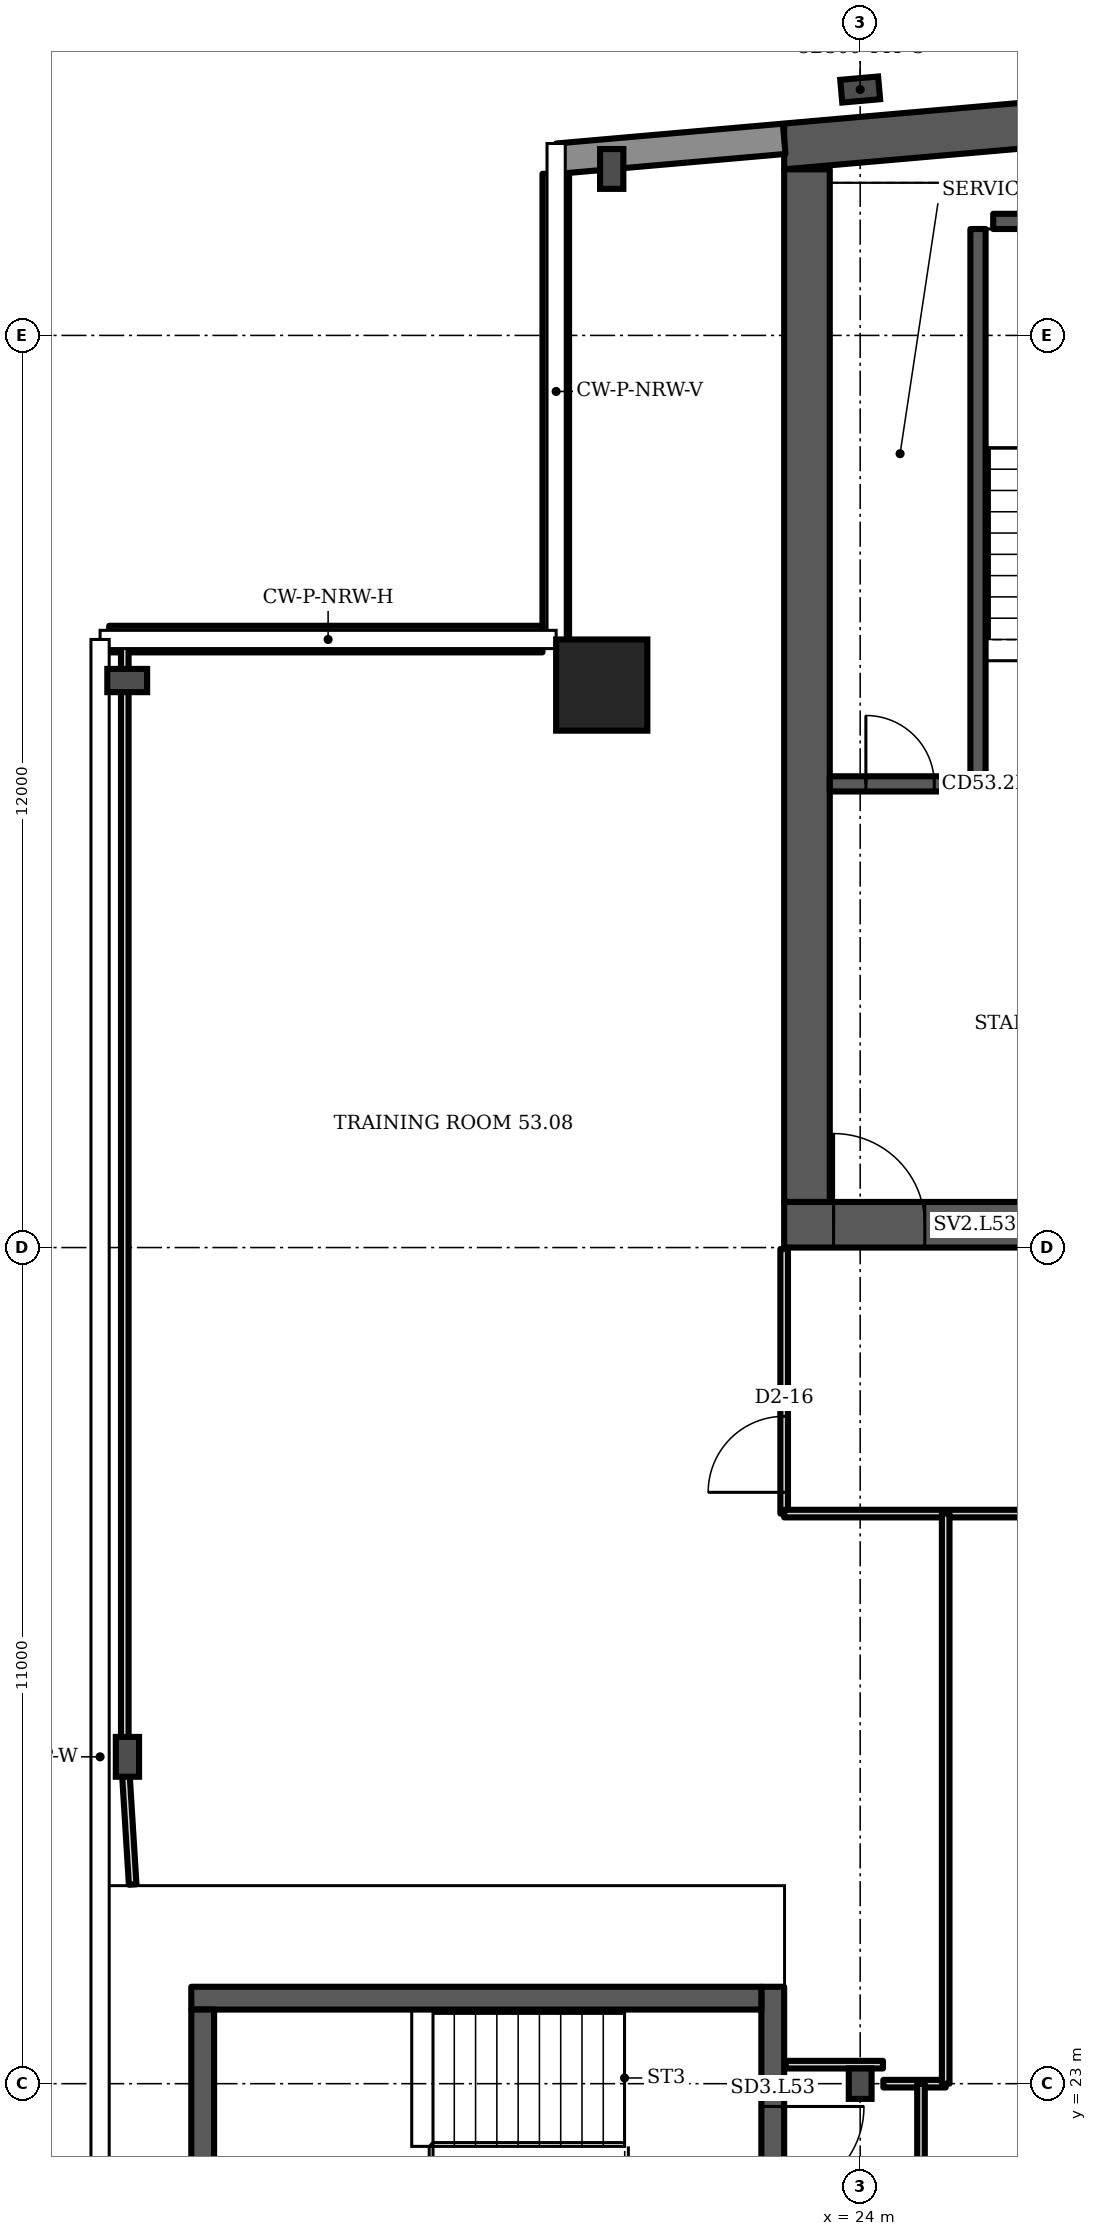
"""IFC4 building model, lengths in metres.
Left out: names, types, materials, properties, quantities, classifications, styles, units other than length and angle.
Written with IfcOpenShell. Run it as: python <this file> out.ifc"""

import sys

from ifc_helpers import new_model, si_unit, direction, frame, frame_2d, origin, origin_2d, place, context, subcontext, project, spatial, polyline, rectangle, i_section, outline, extrude, element, fill, save


model = new_model("IFC4")
c1 = context("Model", 3, precision=1e-05, world=origin(), true_north=direction((0.0, 1.0)))
c2 = subcontext(c1, "Body", "Model", "MODEL_VIEW")
j1 = project(units=[si_unit("LENGTHUNIT", "METRE"), si_unit("PLANEANGLEUNIT", "RADIAN")], contexts=[c1])
p1 = place(None, origin())
s1 = spatial("IfcSite", under=j1, at=p1, CompositionType="ELEMENT")
p2 = place(p1, origin())
s2 = spatial("IfcBuilding", under=s1, at=p2, CompositionType="ELEMENT")
p3 = place(p2, frame((0.0, 0.0, 214.3)))
s3 = spatial("IfcBuildingStorey", under=s2, at=p3, CompositionType="ELEMENT", Elevation=214.3)
p4 = place(p3, frame((0.0, 0.0, -0.0)))
e1 = element("IfcWall", 1, at=p4, inside=s3, PredefinedType="SHEAR", context=c2, shape_type="SweptSolid", body=[
    extrude(outline(polyline([(23.0, 48.185), (40.5, 49.716), (58.0, 48.185), (58.0, 48.787), (40.5, 50.318), (23.0, 48.787), (23.0, 48.185)])), origin(), (0.0, 0.0, 1.0), 3.6),
])
p5 = place(p3, frame((23.0, 34.3, 0.0), z_axis=(0.0, 0.0, 1.0), x_axis=(1.0, 0.0, 0.0)))
e2 = element("IfcWall", 2, at=p5, inside=s3, PredefinedType="SHEAR", context=c2, shape_type="SweptSolid", body=[
    extrude(rectangle(XDim=35.0, YDim=0.6, at=frame_2d((17.5, 0.0))), origin(), (0.0, 0.0, 1.0), 3.6),
])
p6 = place(p5, frame((0.65, 0.0, 0.0)))
e3 = element("IfcOpeningElement", 3, at=p6, cuts=e2, PredefinedType="OPENING", context=c2, shape_type="SweptSolid", body=[
    extrude(rectangle(XDim=1.2, YDim=2.1, at=frame_2d((0.6, 1.05))), frame((0.0, 0.31, 0.0), z_axis=(0.0, -1.0, 0.0), x_axis=(1.0, 0.0, 0.0)), (0.0, 0.0, 1.0), 0.62),
])
p7 = place(p5, frame((7.717, 0.0, 0.0)))
e4 = element("IfcOpeningElement", 4, at=p7, cuts=e2, PredefinedType="OPENING", context=c2, shape_type="SweptSolid", body=[
    extrude(rectangle(XDim=1.1, YDim=2.1, at=frame_2d((0.55, 1.05))), frame((0.0, 0.31, 0.0), z_axis=(0.0, -1.0, 0.0), x_axis=(1.0, 0.0, 0.0)), (0.0, 0.0, 1.0), 0.62),
])
p8 = place(p5, frame((12.183, 0.0, 0.0)))
e5 = element("IfcOpeningElement", 5, at=p8, cuts=e2, PredefinedType="OPENING", context=c2, shape_type="SweptSolid", body=[
    extrude(rectangle(XDim=1.1, YDim=2.1, at=frame_2d((0.55, 1.05))), frame((0.0, 0.31, 0.0), z_axis=(0.0, -1.0, 0.0), x_axis=(1.0, 0.0, 0.0)), (0.0, 0.0, 1.0), 0.62),
])
p9 = place(p5, frame((9.8, 0.0, 0.0)))
e6 = element("IfcOpeningElement", 6, at=p9, cuts=e2, PredefinedType="OPENING", context=c2, shape_type="SweptSolid", body=[
    extrude(rectangle(XDim=1.4, YDim=2.1, at=frame_2d((0.7, 1.05))), frame((0.0, 0.31, 0.0), z_axis=(0.0, -1.0, 0.0), x_axis=(1.0, 0.0, 0.0)), (0.0, 0.0, 1.0), 0.62),
])
p10 = place(p5, frame((14.717, 0.0, 0.0)))
e7 = element("IfcOpeningElement", 7, at=p10, cuts=e2, PredefinedType="OPENING", context=c2, shape_type="SweptSolid", body=[
    extrude(rectangle(XDim=1.1, YDim=2.1, at=frame_2d((0.55, 1.05))), frame((0.0, 0.31, 0.0), z_axis=(0.0, -1.0, 0.0), x_axis=(1.0, 0.0, 0.0)), (0.0, 0.0, 1.0), 0.62),
])
p11 = place(p5, frame((16.95, 0.0, 0.0)))
e8 = element("IfcOpeningElement", 8, at=p11, cuts=e2, PredefinedType="OPENING", context=c2, shape_type="SweptSolid", body=[
    extrude(rectangle(XDim=1.1, YDim=2.1, at=frame_2d((0.55, 1.05))), frame((0.0, 0.31, 0.0), z_axis=(0.0, -1.0, 0.0), x_axis=(1.0, 0.0, 0.0)), (0.0, 0.0, 1.0), 0.62),
])
p12 = place(p5, frame((19.183, 0.0, 0.0)))
e9 = element("IfcOpeningElement", 9, at=p12, cuts=e2, PredefinedType="OPENING", context=c2, shape_type="SweptSolid", body=[
    extrude(rectangle(XDim=1.1, YDim=2.1, at=frame_2d((0.55, 1.05))), frame((0.0, 0.31, 0.0), z_axis=(0.0, -1.0, 0.0), x_axis=(1.0, 0.0, 0.0)), (0.0, 0.0, 1.0), 0.62),
])
p13 = place(p5, frame((26.15, 0.0, 0.0)))
e10 = element("IfcOpeningElement", 10, at=p13, cuts=e2, PredefinedType="OPENING", context=c2, shape_type="SweptSolid", body=[
    extrude(rectangle(XDim=1.2, YDim=2.1, at=frame_2d((0.6, 1.05))), frame((0.0, 0.31, 0.0), z_axis=(0.0, -1.0, 0.0), x_axis=(1.0, 0.0, 0.0)), (0.0, 0.0, 1.0), 0.62),
])
p14 = place(p5, frame((30.8, 0.0, 0.0)))
e11 = element("IfcOpeningElement", 11, at=p14, cuts=e2, PredefinedType="OPENING", context=c2, shape_type="SweptSolid", body=[
    extrude(rectangle(XDim=1.4, YDim=2.1, at=frame_2d((0.7, 1.05))), frame((0.0, 0.31, 0.0), z_axis=(0.0, -1.0, 0.0), x_axis=(1.0, 0.0, 0.0)), (0.0, 0.0, 1.0), 0.62),
])
p15 = place(p3, frame((23.3, 34.6, 0.0), z_axis=(0.0, 0.0, 1.0), x_axis=(0.0, 1.0, 0.0)))
e12 = element("IfcWall", 12, at=p15, inside=s3, PredefinedType="SHEAR", context=c2, shape_type="SweptSolid", body=[
    extrude(rectangle(XDim=13.585, YDim=0.6, at=frame_2d((6.792, 0.0))), origin(), (0.0, 0.0, 1.0), 3.6),
])
p16 = place(p3, frame((20.6, 41.4, 0.0), z_axis=(0.0, 0.0, 1.0), x_axis=(1.0, 0.0, 0.0)))
e13 = element("IfcColumn", 13, at=p16, inside=s3, PredefinedType="COLUMN", context=c2, shape_type="SweptSolid", body=[
    extrude(rectangle(XDim=1.2, YDim=1.2, at=origin_2d()), origin(), (0.0, 0.0, 1.0), 3.6),
])
for number, where, z_axis, x_axis in (
    (14, (20.731, 48.19, 0.0), (0.0, 0.0, 1.0), (-1.0, 0.0, 0.0)),
    (15, (14.357, 41.46, 0.0), (0.0, 0.0, 1.0), (0.0, 1.0, 0.0)),
    (16, (14.36, 27.3, 0.0), (0.0, 0.0, 1.0), (-1.0, 0.0, 0.0)),
):
    element("IfcColumn", number, at=place(p3, frame(where, z_axis=z_axis, x_axis=x_axis)), inside=s3, PredefinedType="COLUMN", context=c2, shape_type="SweptSolid", body=[
        extrude(i_section(OverallWidth=0.306, OverallDepth=0.524, WebThickness=0.021, FlangeThickness=0.04, FilletRadius=0.027, at=origin_2d()), origin(), (0.0, 0.0, 1.0), 3.6),
    ])
p17 = place(p3, frame((24.0, 23.0, 0.0), z_axis=(0.0, 0.0, 1.0), x_axis=(1.0, 0.0, 0.0)))
e17 = element("IfcColumn", 17, at=p17, inside=s3, PredefinedType="COLUMN", context=c2, shape_type="SweptSolid", body=[
    extrude(i_section(OverallWidth=0.3, OverallDepth=0.4, WebThickness=0.013, FlangeThickness=0.024, FilletRadius=0.027, at=origin_2d()), origin(), (0.0, 0.0, 1.0), 3.6),
])
p18 = place(p3, frame((24.0, 49.235, 0.0), z_axis=(0.0, 0.0, 1.0), x_axis=(-0.087156, 0.996197, 0.0)))
e18 = element("IfcColumn", 18, at=p18, inside=s3, PredefinedType="COLUMN", context=c2, shape_type="SweptSolid", body=[
    extrude(i_section(OverallWidth=0.3, OverallDepth=0.5, WebThickness=0.014, FlangeThickness=0.028, FilletRadius=0.027, at=origin_2d()), origin(), (0.0, 0.0, 1.0), 3.6),
])
p19 = place(p3, frame((23.0, 48.587, 0.0), z_axis=(0.0, 0.0, 1.0), x_axis=(-0.996194, -0.087168, 0.0)))
e19 = element("IfcWall", 19, at=p19, inside=s3, PredefinedType="SOLIDWALL", context=c2, shape_type="SweptSolid", body=[
    extrude(rectangle(XDim=2.994, YDim=0.4, at=frame_2d((1.497, 0.0))), origin(), (0.0, 0.0, 1.0), 3.2),
])
p20 = place(p3, frame((19.995, 48.126, 0.0), z_axis=(0.0, 0.0, 1.0), x_axis=(0.0, -1.0, 0.0)))
e20 = element("IfcWall", 20, at=p20, inside=s3, PredefinedType="SOLIDWALL", context=c2, shape_type="SweptSolid", body=[
    extrude(rectangle(XDim=6.126, YDim=0.35, at=frame_2d((3.063, 0.0))), origin(), (0.0, 0.0, 1.0), 1.0),
])
p21 = place(p3, frame((19.82, 42.005, 0.0), z_axis=(0.0, 0.0, 1.0), x_axis=(-1.0, 0.0, 0.0)))
e21 = element("IfcWall", 21, at=p21, inside=s3, PredefinedType="SOLIDWALL", context=c2, shape_type="SweptSolid", body=[
    extrude(rectangle(XDim=5.7, YDim=0.35, at=frame_2d((2.85, 0.0))), origin(), (0.0, 0.0, 1.0), 1.0),
])
p22 = place(p3, frame((23.6, 40.1, 0.0), z_axis=(0.0, 0.0, 1.0), x_axis=(1.0, 0.0, 0.0)))
e22 = element("IfcWall", 22, at=p22, inside=s3, PredefinedType="SHEAR", context=c2, shape_type="SweptSolid", body=[
    extrude(rectangle(XDim=6.1, YDim=0.2, at=frame_2d((3.05, 0.0))), origin(), (0.0, 0.0, 1.0), 3.2),
])
p23 = place(p22, frame((3.325, 0.0, 0.0)))
e23 = element("IfcOpeningElement", 23, at=p23, cuts=e22, PredefinedType="OPENING", context=c2, shape_type="SweptSolid", body=[
    extrude(rectangle(XDim=1.2, YDim=2.1, at=frame_2d((0.6, 1.05))), frame((0.0, 0.11, 0.0), z_axis=(0.0, -1.0, 0.0), x_axis=(1.0, 0.0, 0.0)), (0.0, 0.0, 1.0), 0.22),
])
p24 = place(p22, frame((0.475, 0.0, 0.0)))
e24 = element("IfcOpeningElement", 24, at=p24, cuts=e22, PredefinedType="OPENING", context=c2, shape_type="SweptSolid", body=[
    extrude(rectangle(XDim=0.9, YDim=2.1, at=frame_2d((0.45, 1.05))), frame((0.0, 0.11, 0.0), z_axis=(0.0, -1.0, 0.0), x_axis=(1.0, 0.0, 0.0)), (0.0, 0.0, 1.0), 0.22),
])
p25 = place(p3, frame((25.55, 40.2, 0.0), z_axis=(0.0, 0.0, 1.0), x_axis=(0.0, 1.0, 0.0)))
e25 = element("IfcWall", 25, at=p25, inside=s3, PredefinedType="SHEAR", context=c2, shape_type="SweptSolid", body=[
    extrude(rectangle(XDim=7.2, YDim=0.2, at=frame_2d((3.6, 0.0))), origin(), (0.0, 0.0, 1.0), 3.2),
])
p26 = place(p3, frame((25.75, 47.5, 0.0), z_axis=(0.0, 0.0, 1.0), x_axis=(1.0, 0.0, 0.0)))
e26 = element("IfcWall", 26, at=p26, inside=s3, PredefinedType="SHEAR", context=c2, shape_type="SweptSolid", body=[
    extrude(rectangle(XDim=3.95, YDim=0.2, at=frame_2d((1.975, 0.0))), origin(), (0.0, 0.0, 1.0), 3.2),
])
p27 = place(p3, frame((22.85, 19.925, 0.0), z_axis=(0.0, 0.0, 1.0), x_axis=(0.0, 1.0, 0.0)))
e27 = element("IfcWall", 27, at=p27, inside=s3, PredefinedType="SHEAR", context=c2, shape_type="SweptSolid", body=[
    extrude(rectangle(XDim=4.35, YDim=0.3, at=frame_2d((2.175, 0.0))), origin(), (0.0, 0.0, 1.0), 3.2),
])
p28 = place(p27, frame((1.575, 0.0, 0.0)))
e28 = element("IfcOpeningElement", 28, at=p28, cuts=e27, PredefinedType="OPENING", context=c2, shape_type="SweptSolid", body=[
    extrude(rectangle(XDim=1.2, YDim=2.1, at=frame_2d((0.6, 1.05))), frame((0.0, 0.16, 0.0), z_axis=(0.0, -1.0, 0.0), x_axis=(1.0, 0.0, 0.0)), (0.0, 0.0, 1.0), 0.32),
])
p29 = place(p3, frame((14.325, 27.3, 0.0), z_axis=(0.0, 0.0, 1.0), x_axis=(0.0, 1.0, 0.0)))
e29 = element("IfcWall", 29, at=p29, inside=s3, PredefinedType="PARTITIONING", context=c2, shape_type="SweptSolid", body=[
    extrude(rectangle(XDim=14.68, YDim=0.1, at=frame_2d((7.34, 0.0))), origin(), (0.0, 0.0, 1.0), 2.58),
])
p30 = place(p3, frame((14.429, 25.62, 0.0), z_axis=(0.0, 0.0, 1.0), x_axis=(-0.061647, 0.998101, 0.0)))
e30 = element("IfcWall", 30, at=p30, inside=s3, PredefinedType="PARTITIONING", context=c2, shape_type="SweptSolid", body=[
    extrude(rectangle(XDim=1.683, YDim=0.1, at=frame_2d((0.842, 0.0))), origin(), (0.0, 0.0, 1.0), 2.58),
])
p31 = place(p3, frame((23.0, 30.5, 0.0), z_axis=(0.0, 0.0, 1.0), x_axis=(0.0, 1.0, 0.0)))
e31 = element("IfcWall", 31, at=p31, inside=s3, PredefinedType="PARTITIONING", context=c2, shape_type="SweptSolid", body=[
    extrude(rectangle(XDim=3.48, YDim=0.1, at=frame_2d((1.74, 0.0))), origin(), (0.0, 0.0, 1.0), 3.2),
])
p32 = place(p31, frame((0.28, 0.0, 0.0)))
e32 = element("IfcOpeningElement", 32, at=p32, cuts=e31, PredefinedType="OPENING", context=c2, shape_type="SweptSolid", body=[
    extrude(rectangle(XDim=1.0, YDim=2.1, at=frame_2d((0.5, 1.05))), frame((0.0, 0.06, 0.0), z_axis=(0.0, -1.0, 0.0), x_axis=(1.0, 0.0, 0.0)), (0.0, 0.0, 1.0), 0.12),
])
p33 = place(p3, frame((23.0, 30.5, 0.0), z_axis=(0.0, 0.0, 1.0), x_axis=(1.0, 0.0, 0.0)))
e33 = element("IfcWall", 33, at=p33, inside=s3, PredefinedType="PARTITIONING", context=c2, shape_type="SweptSolid", body=[
    extrude(rectangle(XDim=13.85, YDim=0.1, at=frame_2d((6.925, 0.0))), origin(), (0.0, 0.0, 1.0), 3.2),
])
p34 = place(p33, frame((3.545, 0.0, 0.0)))
e34 = element("IfcOpeningElement", 34, at=p34, cuts=e33, PredefinedType="OPENING", context=c2, shape_type="SweptSolid", body=[
    extrude(rectangle(XDim=1.0, YDim=2.1, at=frame_2d((0.5, 1.05))), frame((0.0, 0.06, 0.0), z_axis=(0.0, -1.0, 0.0), x_axis=(1.0, 0.0, 0.0)), (0.0, 0.0, 1.0), 0.12),
])
p35 = place(p33, frame((11.545, 0.0, 0.0)))
e35 = element("IfcOpeningElement", 35, at=p35, cuts=e33, PredefinedType="OPENING", context=c2, shape_type="SweptSolid", body=[
    extrude(rectangle(XDim=1.0, YDim=2.1, at=frame_2d((0.5, 1.05))), frame((0.0, 0.06, 0.0), z_axis=(0.0, -1.0, 0.0), x_axis=(1.0, 0.0, 0.0)), (0.0, 0.0, 1.0), 0.12),
])
p36 = place(p3, frame((23.02, 23.25, 0.0), z_axis=(0.0, 0.0, 1.0), x_axis=(1.0, 0.0, 0.0)))
e36 = element("IfcWall", 36, at=p36, inside=s3, PredefinedType="PARTITIONING", context=c2, shape_type="SweptSolid", body=[
    extrude(rectangle(XDim=1.28, YDim=0.1, at=frame_2d((0.64, 0.0))), origin(), (0.0, 0.0, 1.0), 3.2),
])
p37 = place(p3, frame((24.305, 23.0, 0.0), z_axis=(0.0, 0.0, 1.0), x_axis=(1.0, 0.0, 0.0)))
e37 = element("IfcWall", 37, at=p37, inside=s3, PredefinedType="PARTITIONING", context=c2, shape_type="SweptSolid", body=[
    extrude(rectangle(XDim=0.82, YDim=0.1, at=frame_2d((0.41, 0.0))), origin(), (0.0, 0.0, 1.0), 3.2),
])
p38 = place(p3, frame((24.8, 19.2, 0.0), z_axis=(0.0, 0.0, 1.0), x_axis=(0.0, 1.0, 0.0)))
e38 = element("IfcWall", 38, at=p38, inside=s3, PredefinedType="PARTITIONING", context=c2, shape_type="SweptSolid", body=[
    extrude(rectangle(XDim=3.8, YDim=0.1, at=frame_2d((1.9, 0.0))), origin(), (0.0, 0.0, 1.0), 3.2),
])
p39 = place(p3, frame((25.125, 23.0, 0.0), z_axis=(0.0, 0.0, 1.0), x_axis=(0.0, 1.0, 0.0)))
e39 = element("IfcWall", 39, at=p39, inside=s3, PredefinedType="PARTITIONING", context=c2, shape_type="SweptSolid", body=[
    extrude(rectangle(XDim=7.5, YDim=0.1, at=frame_2d((3.75, 0.0))), origin(), (0.0, 0.0, 1.0), 3.2),
])
p40 = place(p3, frame((15.2, 24.125, 0.0), z_axis=(0.0, 0.0, 1.0), x_axis=(1.0, 0.0, 0.0)))
e40 = element("IfcWall", 40, at=p40, inside=s3, PredefinedType="SHEAR", context=c2, shape_type="SweptSolid", body=[
    extrude(rectangle(XDim=7.5, YDim=0.3, at=frame_2d((3.75, 0.0))), origin(), (0.0, 0.0, 1.0), 3.2),
])
p41 = place(p3, frame((15.35, 20.225, 0.0), z_axis=(0.0, 0.0, 1.0), x_axis=(0.0, 1.0, 0.0)))
e41 = element("IfcWall", 41, at=p41, inside=s3, PredefinedType="SHEAR", context=c2, shape_type="SweptSolid", body=[
    extrude(rectangle(XDim=3.75, YDim=0.3, at=frame_2d((1.875, 0.0))), origin(), (0.0, 0.0, 1.0), 3.2),
])
p42 = place(p24, origin())
e42 = element("IfcDoor", 42, at=p42, inside=s3, OperationType="SINGLE_SWING_LEFT", PredefinedType="DOOR", context=c2, shape_type="SweptSolid", body=[
    extrude(rectangle(XDim=0.9, YDim=2.1, at=frame_2d((0.45, 1.05))), frame((0.0, 0.025, 0.0), z_axis=(0.0, -1.0, 0.0), x_axis=(1.0, 0.0, 0.0)), (0.0, 0.0, 1.0), 0.05),
])
fill(e24, e42)
p43 = place(p6, origin())
e43 = element("IfcDoor", 43, at=p43, inside=s3, OperationType="SINGLE_SWING_LEFT", PredefinedType="DOOR", context=c2, shape_type="SweptSolid", body=[
    extrude(rectangle(XDim=1.2, YDim=2.1, at=frame_2d((0.6, 1.05))), frame((0.0, 0.025, 0.0), z_axis=(0.0, -1.0, 0.0), x_axis=(1.0, 0.0, 0.0)), (0.0, 0.0, 1.0), 0.05),
])
fill(e3, e43)
p44 = place(p28, origin())
e44 = element("IfcDoor", 44, at=p44, inside=s3, OperationType="SINGLE_SWING_RIGHT", PredefinedType="DOOR", context=c2, shape_type="SweptSolid", body=[
    extrude(rectangle(XDim=1.2, YDim=2.1, at=frame_2d((0.6, 1.05))), frame((0.0, 0.025, 0.0), z_axis=(0.0, -1.0, 0.0), x_axis=(1.0, 0.0, 0.0)), (0.0, 0.0, 1.0), 0.05),
])
fill(e28, e44)
p45 = place(p32, origin())
e45 = element("IfcDoor", 45, at=p45, inside=s3, OperationType="SINGLE_SWING_LEFT", PredefinedType="DOOR", context=c2, shape_type="SweptSolid", body=[
    extrude(rectangle(XDim=1.0, YDim=2.1, at=frame_2d((0.5, 1.05))), frame((0.0, 0.025, 0.0), z_axis=(0.0, -1.0, 0.0), x_axis=(1.0, 0.0, 0.0)), (0.0, 0.0, 1.0), 0.05),
])
fill(e32, e45)
save(model, sys.argv[1])
